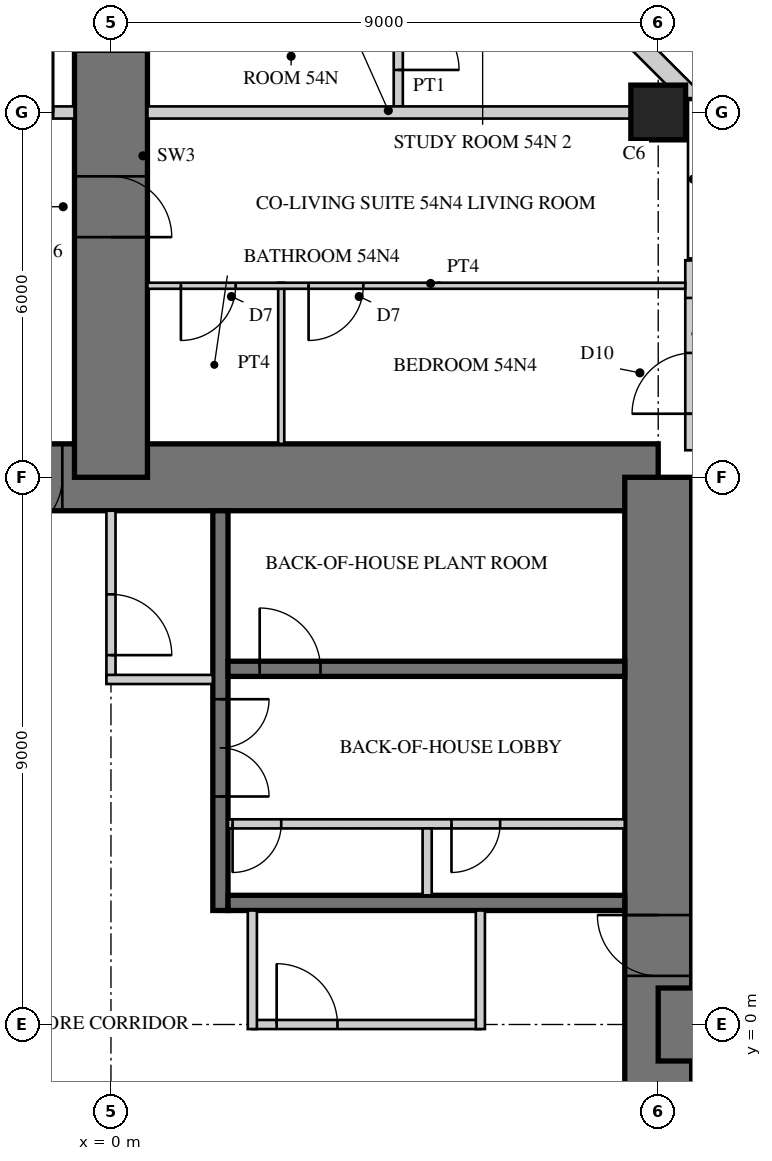
"""IFC4 building model, lengths in metres.
Left out: names, types, materials, properties, quantities, classifications, styles, units other than length and angle.
Written with IfcOpenShell. Run it as: python <this file> out.ifc"""

import sys

from ifc_helpers import new_model, si_unit, direction, frame, frame_2d, origin, origin_2d, place, context, subcontext, project, spatial, rectangle, hollow_rectangle, extrude, element, fill, save


model = new_model("IFC4")
c1 = context("Model", 3, precision=1e-05, world=origin(), true_north=direction((0.0, 1.0)))
c2 = subcontext(c1, "Body", "Model", "MODEL_VIEW")
j1 = project(units=[si_unit("LENGTHUNIT", "METRE"), si_unit("PLANEANGLEUNIT", "RADIAN")], contexts=[c1])
p1 = place(None, origin())
s1 = spatial("IfcSite", under=j1, at=p1, CompositionType="ELEMENT")
p2 = place(p1, origin())
s2 = spatial("IfcBuilding", under=s1, at=p2, CompositionType="ELEMENT")
p3 = place(p2, frame((0.0, 0.0, 213.7)))
s3 = spatial("IfcBuildingStorey", under=s2, at=p3, CompositionType="ELEMENT", Elevation=213.7)
p4 = place(p3, frame((9.0, 9.0, 0.0), z_axis=(0.0, 0.0, 1.0), x_axis=(-1.0, 0.0, 0.0)))
e1 = element("IfcWall", 1, at=p4, inside=s3, PredefinedType="SHEAR", context=c2, shape_type="SweptSolid", body=[
    extrude(rectangle(XDim=18.0, YDim=1.1, at=frame_2d((9.0, 0.0))), origin(), (0.0, 0.0, 1.0), 3.4),
])
p5 = place(p4, frame((9.8, 0.0, 0.0)))
e2 = element("IfcOpeningElement", 2, at=p5, cuts=e1, PredefinedType="OPENING", context=c2, shape_type="SweptSolid", body=[
    extrude(rectangle(XDim=1.0, YDim=2.4, at=frame_2d((0.5, 1.2))), frame((0.0, 0.56, 0.0), z_axis=(0.0, -1.0, 0.0), x_axis=(1.0, 0.0, 0.0)), (0.0, 0.0, 1.0), 1.12),
])
p6 = place(p3, frame((9.0, -9.0, 0.0), z_axis=(0.0, 0.0, 1.0), x_axis=(0.0, 1.0, 0.0)))
e3 = element("IfcWall", 3, at=p6, inside=s3, PredefinedType="SHEAR", context=c2, shape_type="SweptSolid", body=[
    extrude(rectangle(XDim=18.0, YDim=1.1, at=frame_2d((9.0, 0.0))), origin(), (0.0, 0.0, 1.0), 3.4),
])
p7 = place(p6, frame((9.8, 0.0, 0.0)))
e4 = element("IfcOpeningElement", 4, at=p7, cuts=e3, PredefinedType="OPENING", context=c2, shape_type="SweptSolid", body=[
    extrude(rectangle(XDim=1.0, YDim=2.4, at=frame_2d((0.5, 1.2))), frame((0.0, 0.56, 0.0), z_axis=(0.0, -1.0, 0.0), x_axis=(1.0, 0.0, 0.0)), (0.0, 0.0, 1.0), 1.12),
])
p8 = place(p3, frame((1.8, 1.875, 0.0), z_axis=(0.0, 0.0, 1.0), x_axis=(0.0, 1.0, 0.0)))
e5 = element("IfcWall", 5, at=p8, inside=s3, PredefinedType="SHEAR", context=c2, shape_type="SweptSolid", body=[
    extrude(rectangle(XDim=6.575, YDim=0.25, at=frame_2d((3.288, 0.0))), origin(), (0.0, 0.0, 1.0), 3.4),
])
p9 = place(p8, frame((1.875, 0.0, 0.0)))
e6 = element("IfcOpeningElement", 6, at=p9, cuts=e5, PredefinedType="OPENING", context=c2, shape_type="SweptSolid", body=[
    extrude(rectangle(XDim=1.6, YDim=2.4, at=frame_2d((0.8, 1.2))), frame((0.0, 0.135, 0.0), z_axis=(0.0, -1.0, 0.0), x_axis=(1.0, 0.0, 0.0)), (0.0, 0.0, 1.0), 0.27),
])
p10 = place(p3, frame((1.925, 2.0, 0.0), z_axis=(0.0, 0.0, 1.0), x_axis=(1.0, 0.0, 0.0)))
e7 = element("IfcWall", 7, at=p10, inside=s3, PredefinedType="SHEAR", context=c2, shape_type="SweptSolid", body=[
    extrude(rectangle(XDim=6.525, YDim=0.25, at=frame_2d((3.262, 0.0))), origin(), (0.0, 0.0, 1.0), 3.4),
])
p11 = place(p3, frame((1.925, 5.85, 0.0), z_axis=(0.0, 0.0, 1.0), x_axis=(1.0, 0.0, 0.0)))
e8 = element("IfcWall", 8, at=p11, inside=s3, PredefinedType="SHEAR", context=c2, shape_type="SweptSolid", body=[
    extrude(rectangle(XDim=6.525, YDim=0.25, at=frame_2d((3.262, 0.0))), origin(), (0.0, 0.0, 1.0), 3.4),
])
p12 = place(p11, frame((0.521, 0.0, 0.0)))
e9 = element("IfcOpeningElement", 9, at=p12, cuts=e8, PredefinedType="OPENING", context=c2, shape_type="SweptSolid", body=[
    extrude(rectangle(XDim=1.0, YDim=2.1, at=frame_2d((0.5, 1.05))), frame((0.0, 0.135, 0.0), z_axis=(0.0, -1.0, 0.0), x_axis=(1.0, 0.0, 0.0)), (0.0, 0.0, 1.0), 0.27),
])
p13 = place(p3, frame((1.925, 3.3, 0.0), z_axis=(0.0, 0.0, 1.0), x_axis=(1.0, 0.0, 0.0)))
e10 = element("IfcWall", 10, at=p13, inside=s3, PredefinedType="PARTITIONING", context=c2, shape_type="SweptSolid", body=[
    extrude(rectangle(XDim=6.525, YDim=0.15, at=frame_2d((3.262, 0.0))), origin(), (0.0, 0.0, 1.0), 3.4),
])
p14 = place(p13, frame((0.075, 0.0, 0.0)))
e11 = element("IfcOpeningElement", 11, at=p14, cuts=e10, PredefinedType="OPENING", context=c2, shape_type="SweptSolid", body=[
    extrude(rectangle(XDim=0.8, YDim=2.1, at=frame_2d((0.4, 1.05))), frame((0.0, 0.085, 0.0), z_axis=(0.0, -1.0, 0.0), x_axis=(1.0, 0.0, 0.0)), (0.0, 0.0, 1.0), 0.17),
])
p15 = place(p13, frame((3.675, 0.0, 0.0)))
e12 = element("IfcOpeningElement", 12, at=p15, cuts=e10, PredefinedType="OPENING", context=c2, shape_type="SweptSolid", body=[
    extrude(rectangle(XDim=0.8, YDim=2.1, at=frame_2d((0.4, 1.05))), frame((0.0, 0.085, 0.0), z_axis=(0.0, -1.0, 0.0), x_axis=(1.0, 0.0, 0.0)), (0.0, 0.0, 1.0), 0.17),
])
p16 = place(p3, frame((5.2, 2.125, 0.0), z_axis=(0.0, 0.0, 1.0), x_axis=(0.0, 1.0, 0.0)))
e13 = element("IfcWall", 13, at=p16, inside=s3, PredefinedType="PARTITIONING", context=c2, shape_type="SweptSolid", body=[
    extrude(rectangle(XDim=1.1, YDim=0.15, at=frame_2d((0.55, 0.0))), origin(), (0.0, 0.0, 1.0), 3.4),
])
p17 = place(p3, frame((0.0, 9.0, 0.0), z_axis=(0.0, 0.0, 1.0), x_axis=(0.0, 1.0, 0.0)))
e14 = element("IfcWall", 14, at=p17, inside=s3, PredefinedType="SHEAR", context=c2, shape_type="SweptSolid", body=[
    extrude(rectangle(XDim=9.0, YDim=1.2, at=frame_2d((4.5, 0.0))), origin(), (0.0, 0.0, 1.0), 3.4),
])
p18 = place(p17, frame((3.95, 0.0, 0.0)))
e15 = element("IfcOpeningElement", 15, at=p18, cuts=e14, PredefinedType="OPENING", context=c2, shape_type="SweptSolid", body=[
    extrude(rectangle(XDim=1.0, YDim=2.15, at=frame_2d((0.5, 1.075))), frame((0.0, 0.61, 0.0), z_axis=(0.0, -1.0, 0.0), x_axis=(1.0, 0.0, 0.0)), (0.0, 0.0, 1.0), 1.22),
])
p19 = place(p17, frame((7.0, 0.0, 0.0)))
e16 = element("IfcOpeningElement", 16, at=p19, cuts=e14, PredefinedType="OPENING", context=c2, shape_type="SweptSolid", body=[
    extrude(rectangle(XDim=1.0, YDim=2.2, at=frame_2d((0.5, 1.1))), frame((0.0, 0.61, 0.0), z_axis=(0.0, -1.0, 0.0), x_axis=(1.0, 0.0, 0.0)), (0.0, 0.0, 1.0), 1.22),
])
p20 = place(p3, frame((9.0, 0.0, 0.0), z_axis=(0.0, 0.0, 1.0), x_axis=(1.0, 0.0, 0.0)))
e17 = element("IfcWall", 17, at=p20, inside=s3, PredefinedType="SHEAR", context=c2, shape_type="SweptSolid", body=[
    extrude(rectangle(XDim=9.0, YDim=1.2, at=frame_2d((4.5, 0.0))), origin(), (0.0, 0.0, 1.0), 3.4),
])
p21 = place(p20, frame((3.95, 0.0, 0.0)))
e18 = element("IfcOpeningElement", 18, at=p21, cuts=e17, PredefinedType="OPENING", context=c2, shape_type="SweptSolid", body=[
    extrude(rectangle(XDim=1.0, YDim=2.15, at=frame_2d((0.5, 1.075))), frame((0.0, 0.61, 0.0), z_axis=(0.0, -1.0, 0.0), x_axis=(1.0, 0.0, 0.0)), (0.0, 0.0, 1.0), 1.22),
])
p22 = place(p20, frame((7.0, 0.0, 0.0)))
e19 = element("IfcOpeningElement", 19, at=p22, cuts=e17, PredefinedType="OPENING", context=c2, shape_type="SweptSolid", body=[
    extrude(rectangle(XDim=1.0, YDim=2.2, at=frame_2d((0.5, 1.1))), frame((0.0, 0.61, 0.0), z_axis=(0.0, -1.0, 0.0), x_axis=(1.0, 0.0, 0.0)), (0.0, 0.0, 1.0), 1.22),
])
p23 = place(p3, frame((9.0, 15.0, 0.0), z_axis=(0.0, 0.0, 1.0), x_axis=(1.0, 0.0, 0.0)))
e20 = element("IfcColumn", 20, at=p23, inside=s3, PredefinedType="COLUMN", context=c2, shape_type="SweptSolid", body=[
    extrude(rectangle(XDim=0.9, YDim=0.9, at=origin_2d()), origin(), (0.0, 0.0, 1.0), 3.4),
])
p24 = place(p3, frame((9.57, 9.445, 0.0), z_axis=(0.0, 0.0, 1.0), x_axis=(0.0, 1.0, 0.0)))
e21 = element("IfcWall", 21, at=p24, inside=s3, PredefinedType="SOLIDWALL", context=c2, shape_type="SweptSolid", body=[
    extrude(rectangle(XDim=3.125, YDim=0.25, at=frame_2d((1.562, 0.0))), origin(), (0.0, 0.0, 1.0), 3.15),
])
p25 = place(p24, frame((0.6, 0.0, 0.0)))
e22 = element("IfcOpeningElement", 22, at=p25, cuts=e21, PredefinedType="OPENING", context=c2, shape_type="SweptSolid", body=[
    extrude(rectangle(XDim=1.0, YDim=2.2, at=frame_2d((0.5, 1.1))), frame((0.0, 0.135, 0.0), z_axis=(0.0, -1.0, 0.0), x_axis=(1.0, 0.0, 0.0)), (0.0, 0.0, 1.0), 0.27),
])
p26 = place(p3, frame((9.57, 15.236, 0.0), z_axis=(0.0, 0.0, 1.0), x_axis=(-0.707106781187, 0.707106781187, 0.0)))
e23 = element("IfcWall", 23, at=p26, inside=s3, PredefinedType="SOLIDWALL", context=c2, shape_type="SweptSolid", body=[
    extrude(rectangle(XDim=4.757, YDim=0.3, at=frame_2d((2.379, 0.0))), origin(), (0.0, 0.0, 1.0), 3.15),
])
p27 = place(p26, frame((1.929, 0.0, 0.3)))
e24 = element("IfcOpeningElement", 24, at=p27, cuts=e23, PredefinedType="OPENING", context=c2, shape_type="SweptSolid", body=[
    extrude(rectangle(XDim=0.9, YDim=2.4, at=frame_2d((0.45, 1.2))), frame((0.0, 0.16, 0.0), z_axis=(0.0, -1.0, 0.0), x_axis=(1.0, 0.0, 0.0)), (0.0, 0.0, 1.0), 0.32),
])
p28 = place(p3, frame((2.325, 0.0, 0.0), z_axis=(0.0, 0.0, 1.0), x_axis=(1.0, 0.0, 0.0)))
e25 = element("IfcWall", 25, at=p28, inside=s3, PredefinedType="PARTITIONING", context=c2, shape_type="SweptSolid", body=[
    extrude(rectangle(XDim=3.75, YDim=0.15, at=frame_2d((1.875, 0.0))), origin(), (0.0, 0.0, 1.0), 3.15),
])
p29 = place(p28, frame((0.4, 0.0, 0.0)))
e26 = element("IfcOpeningElement", 26, at=p29, cuts=e25, PredefinedType="OPENING", context=c2, shape_type="SweptSolid", body=[
    extrude(rectangle(XDim=1.0, YDim=2.1, at=frame_2d((0.5, 1.05))), frame((0.0, 0.085, 0.0), z_axis=(0.0, -1.0, 0.0), x_axis=(1.0, 0.0, 0.0)), (0.0, 0.0, 1.0), 0.17),
])
for number, where, z_axis, x_axis in (
    (27, (2.325, 1.875, 0.0), (0.0, 0.0, 1.0), (0.0, -1.0, 0.0)),
    (28, (6.075, -0.075, 0.0), (0.0, 0.0, 1.0), (0.0, 1.0, 0.0)),
):
    element("IfcWall", number, at=place(p3, frame(where, z_axis=z_axis, x_axis=x_axis)), inside=s3, PredefinedType="PARTITIONING", context=c2, shape_type="SweptSolid", body=[
        extrude(rectangle(XDim=1.95, YDim=0.15, at=frame_2d((0.975, 0.0))), origin(), (0.0, 0.0, 1.0), 3.15),
    ])
p30 = place(p3, frame((0.0, 5.675, 0.0), z_axis=(0.0, 0.0, 1.0), x_axis=(0.0, 1.0, 0.0)))
e29 = element("IfcWall", 29, at=p30, inside=s3, PredefinedType="PARTITIONING", context=c2, shape_type="SweptSolid", body=[
    extrude(rectangle(XDim=2.775, YDim=0.15, at=frame_2d((1.387, 0.0))), origin(), (0.0, 0.0, 1.0), 3.15),
])
p31 = place(p30, frame((0.4, 0.0, 0.0)))
e30 = element("IfcOpeningElement", 30, at=p31, cuts=e29, PredefinedType="OPENING", context=c2, shape_type="SweptSolid", body=[
    extrude(rectangle(XDim=1.0, YDim=2.1, at=frame_2d((0.5, 1.05))), frame((0.0, 0.085, 0.0), z_axis=(0.0, -1.0, 0.0), x_axis=(1.0, 0.0, 0.0)), (0.0, 0.0, 1.0), 0.17),
])
p32 = place(p3, frame((1.675, 5.675, 0.0), z_axis=(0.0, 0.0, 1.0), x_axis=(-1.0, 0.0, 0.0)))
e31 = element("IfcWall", 31, at=p32, inside=s3, PredefinedType="PARTITIONING", context=c2, shape_type="SweptSolid", body=[
    extrude(rectangle(XDim=1.75, YDim=0.15, at=frame_2d((0.875, 0.0))), origin(), (0.0, 0.0, 1.0), 3.15),
])
p33 = place(p3, frame((2.8, 9.55, 0.0), z_axis=(0.0, 0.0, 1.0), x_axis=(0.0, 1.0, 0.0)))
e32 = element("IfcWall", 32, at=p33, inside=s3, PredefinedType="PARTITIONING", context=c2, shape_type="SweptSolid", body=[
    extrude(rectangle(XDim=2.65, YDim=0.1, at=frame_2d((1.325, 0.0))), origin(), (0.0, 0.0, 1.0), 3.15),
])
p34 = place(p3, frame((9.445, 12.15, 0.0), z_axis=(0.0, 0.0, 1.0), x_axis=(-1.0, 0.0, 0.0)))
e33 = element("IfcWall", 33, at=p34, inside=s3, PredefinedType="PARTITIONING", context=c2, shape_type="SweptSolid", body=[
    extrude(rectangle(XDim=8.845, YDim=0.1, at=frame_2d((4.422, 0.0))), origin(), (0.0, 0.0, 1.0), 3.15),
])
p35 = place(p34, frame((5.295, 0.0, 0.0)))
e34 = element("IfcOpeningElement", 34, at=p35, cuts=e33, PredefinedType="OPENING", context=c2, shape_type="SweptSolid", body=[
    extrude(rectangle(XDim=0.9, YDim=2.1, at=frame_2d((0.45, 1.05))), frame((0.0, 0.06, 0.0), z_axis=(0.0, -1.0, 0.0), x_axis=(1.0, 0.0, 0.0)), (0.0, 0.0, 1.0), 0.12),
])
p36 = place(p34, frame((7.395, 0.0, 0.0)))
e35 = element("IfcOpeningElement", 35, at=p36, cuts=e33, PredefinedType="OPENING", context=c2, shape_type="SweptSolid", body=[
    extrude(rectangle(XDim=0.9, YDim=2.1, at=frame_2d((0.45, 1.05))), frame((0.0, 0.06, 0.0), z_axis=(0.0, -1.0, 0.0), x_axis=(1.0, 0.0, 0.0)), (0.0, 0.0, 1.0), 0.12),
])
p37 = place(p3, frame((4.725, 15.1, 0.0), z_axis=(0.0, 0.0, 1.0), x_axis=(0.0, 1.0, 0.0)))
e36 = element("IfcWall", 36, at=p37, inside=s3, PredefinedType="PARTITIONING", context=c2, shape_type="SweptSolid", body=[
    extrude(rectangle(XDim=2.45, YDim=0.15, at=frame_2d((1.225, 0.0))), origin(), (0.0, 0.0, 1.0), 3.15),
])
p38 = place(p37, frame((0.6, 0.0, 0.0)))
e37 = element("IfcOpeningElement", 37, at=p38, cuts=e36, PredefinedType="OPENING", context=c2, shape_type="SweptSolid", body=[
    extrude(rectangle(XDim=1.0, YDim=2.1, at=frame_2d((0.5, 1.05))), frame((0.0, 0.085, 0.0), z_axis=(0.0, -1.0, 0.0), x_axis=(1.0, 0.0, 0.0)), (0.0, 0.0, 1.0), 0.17),
])
p39 = place(p3, frame((8.55, 15.0, 0.0), z_axis=(0.0, 0.0, 1.0), x_axis=(-1.0, 0.0, 0.0)))
e38 = element("IfcWall", 38, at=p39, inside=s3, PredefinedType="SOLIDWALL", context=c2, shape_type="SweptSolid", body=[
    extrude(rectangle(XDim=7.95, YDim=0.2, at=frame_2d((3.975, 0.0))), origin(), (0.0, 0.0, 1.0), 2.1),
])
p40 = place(p3, frame((-0.6, 15.0, 0.0), z_axis=(0.0, 0.0, 1.0), x_axis=(-1.0, 0.0, 0.0)))
e39 = element("IfcWall", 39, at=p40, inside=s3, PredefinedType="SOLIDWALL", context=c2, shape_type="SweptSolid", body=[
    extrude(rectangle(XDim=7.95, YDim=0.2, at=frame_2d((3.975, 0.0))), origin(), (0.0, 0.0, 1.0), 2.1),
])
p41 = place(p40, frame((0.35, 0.0, 0.0)))
e40 = element("IfcOpeningElement", 40, at=p41, cuts=e39, PredefinedType="OPENING", context=c2, shape_type="SweptSolid", body=[
    extrude(rectangle(XDim=1.0, YDim=2.0, at=frame_2d((0.5, 1.0))), frame((0.0, 0.11, 0.0), z_axis=(0.0, -1.0, 0.0), x_axis=(1.0, 0.0, 0.0)), (0.0, 0.0, 1.0), 0.22),
])
p42 = place(p25, origin())
e41 = element("IfcDoor", 41, at=p42, inside=s3, OperationType="SINGLE_SWING_LEFT", PredefinedType="DOOR", context=c2, shape_type="SweptSolid", body=[
    extrude(hollow_rectangle(XDim=1.0, YDim=2.2, WallThickness=0.06, at=frame_2d((0.5, 1.1))), frame((0.0, 0.025, 0.0), z_axis=(0.0, -1.0, 0.0), x_axis=(1.0, 0.0, 0.0)), (0.0, 0.0, 1.0), 0.05),
    extrude(rectangle(XDim=0.879, YDim=2.079, at=frame_2d((0.5, 1.1))), frame((0.0, 0.025, 0.0), z_axis=(0.0, -1.0, 0.0), x_axis=(1.0, 0.0, 0.0)), (0.0, 0.0, 1.0), 0.05),
])
fill(e22, e41)
p43 = place(p29, origin())
e42 = element("IfcDoor", 42, at=p43, inside=s3, OperationType="SINGLE_SWING_LEFT", PredefinedType="DOOR", context=c2, shape_type="SweptSolid", body=[
    extrude(rectangle(XDim=1.0, YDim=2.1, at=frame_2d((0.5, 1.05))), frame((0.0, 0.025, 0.0), z_axis=(0.0, -1.0, 0.0), x_axis=(1.0, 0.0, 0.0)), (0.0, 0.0, 1.0), 0.05),
])
fill(e26, e42)
p44 = place(p31, frame((1.0, 0.0, 0.0), z_axis=(0.0, 0.0, 1.0), x_axis=(-1.0, 0.0, 0.0)))
e43 = element("IfcDoor", 43, at=p44, inside=s3, OperationType="SINGLE_SWING_RIGHT", PredefinedType="DOOR", context=c2, shape_type="SweptSolid", body=[
    extrude(rectangle(XDim=1.0, YDim=2.1, at=frame_2d((0.5, 1.05))), frame((0.0, 0.025, 0.0), z_axis=(0.0, -1.0, 0.0), x_axis=(1.0, 0.0, 0.0)), (0.0, 0.0, 1.0), 0.05),
])
fill(e30, e43)
p45 = place(p35, origin())
e44 = element("IfcDoor", 44, at=p45, inside=s3, OperationType="SINGLE_SWING_RIGHT", PredefinedType="DOOR", context=c2, shape_type="SweptSolid", body=[
    extrude(rectangle(XDim=0.9, YDim=2.1, at=frame_2d((0.45, 1.05))), frame((0.0, 0.025, 0.0), z_axis=(0.0, -1.0, 0.0), x_axis=(1.0, 0.0, 0.0)), (0.0, 0.0, 1.0), 0.05),
])
fill(e34, e44)
p46 = place(p36, origin())
e45 = element("IfcDoor", 45, at=p46, inside=s3, OperationType="SINGLE_SWING_RIGHT", PredefinedType="DOOR", context=c2, shape_type="SweptSolid", body=[
    extrude(rectangle(XDim=0.9, YDim=2.1, at=frame_2d((0.45, 1.05))), frame((0.0, 0.025, 0.0), z_axis=(0.0, -1.0, 0.0), x_axis=(1.0, 0.0, 0.0)), (0.0, 0.0, 1.0), 0.05),
])
fill(e35, e45)
p47 = place(p38, frame((1.0, 0.0, 0.0), z_axis=(0.0, 0.0, 1.0), x_axis=(-1.0, 0.0, 0.0)))
e46 = element("IfcDoor", 46, at=p47, inside=s3, OperationType="SINGLE_SWING_RIGHT", PredefinedType="DOOR", context=c2, shape_type="SweptSolid", body=[
    extrude(rectangle(XDim=1.0, YDim=2.1, at=frame_2d((0.5, 1.05))), frame((0.0, 0.025, 0.0), z_axis=(0.0, -1.0, 0.0), x_axis=(1.0, 0.0, 0.0)), (0.0, 0.0, 1.0), 0.05),
])
fill(e37, e46)
p48 = place(p41, frame((1.0, 0.0, 0.0), z_axis=(0.0, 0.0, 1.0), x_axis=(-1.0, 0.0, 0.0)))
e47 = element("IfcDoor", 47, at=p48, inside=s3, OperationType="SINGLE_SWING_RIGHT", PredefinedType="DOOR", context=c2, shape_type="SweptSolid", body=[
    extrude(rectangle(XDim=1.0, YDim=2.0, at=frame_2d((0.5, 1.0))), frame((0.0, 0.025, 0.0), z_axis=(0.0, -1.0, 0.0), x_axis=(1.0, 0.0, 0.0)), (0.0, 0.0, 1.0), 0.05),
])
fill(e40, e47)
p49 = place(p18, frame((1.0, 0.0, 0.0), z_axis=(0.0, 0.0, 1.0), x_axis=(-1.0, 0.0, 0.0)))
e48 = element("IfcDoor", 48, at=p49, inside=s3, OperationType="SINGLE_SWING_RIGHT", PredefinedType="DOOR", context=c2, shape_type="SweptSolid", body=[
    extrude(rectangle(XDim=1.0, YDim=2.15, at=frame_2d((0.5, 1.075))), frame((0.0, 0.025, 0.0), z_axis=(0.0, -1.0, 0.0), x_axis=(1.0, 0.0, 0.0)), (0.0, 0.0, 1.0), 0.05),
])
fill(e15, e48)
p50 = place(p5, origin())
e49 = element("IfcDoor", 49, at=p50, inside=s3, OperationType="SINGLE_SWING_RIGHT", PredefinedType="DOOR", context=c2, shape_type="SweptSolid", body=[
    extrude(rectangle(XDim=1.0, YDim=2.4, at=frame_2d((0.5, 1.2))), frame((0.0, 0.055, 0.0), z_axis=(0.0, -1.0, 0.0), x_axis=(1.0, 0.0, 0.0)), (0.0, 0.0, 1.0), 0.05),
])
fill(e2, e49)
p51 = place(p7, origin())
e50 = element("IfcDoor", 50, at=p51, inside=s3, OperationType="SINGLE_SWING_RIGHT", PredefinedType="DOOR", context=c2, shape_type="SweptSolid", body=[
    extrude(rectangle(XDim=1.0, YDim=2.4, at=frame_2d((0.5, 1.2))), frame((0.0, 0.055, 0.0), z_axis=(0.0, -1.0, 0.0), x_axis=(1.0, 0.0, 0.0)), (0.0, 0.0, 1.0), 0.05),
])
fill(e4, e50)
p52 = place(p9, frame((1.6, 0.0, 0.0), z_axis=(0.0, 0.0, 1.0), x_axis=(-1.0, 0.0, 0.0)))
e51 = element("IfcDoor", 51, at=p52, inside=s3, OperationType="DOUBLE_DOOR_SINGLE_SWING", PredefinedType="DOOR", context=c2, shape_type="SweptSolid", body=[
    extrude(rectangle(XDim=1.6, YDim=2.4, at=frame_2d((0.8, 1.2))), frame((0.0, 0.025, 0.0), z_axis=(0.0, -1.0, 0.0), x_axis=(1.0, 0.0, 0.0)), (0.0, 0.0, 1.0), 0.05),
])
fill(e6, e51)
p53 = place(p14, frame((0.8, 0.0, 0.0), z_axis=(0.0, 0.0, 1.0), x_axis=(-1.0, 0.0, 0.0)))
e52 = element("IfcDoor", 52, at=p53, inside=s3, OperationType="SINGLE_SWING_RIGHT", PredefinedType="DOOR", context=c2, shape_type="SweptSolid", body=[
    extrude(rectangle(XDim=0.8, YDim=2.1, at=frame_2d((0.4, 1.05))), frame((0.0, 0.025, 0.0), z_axis=(0.0, -1.0, 0.0), x_axis=(1.0, 0.0, 0.0)), (0.0, 0.0, 1.0), 0.05),
])
fill(e11, e52)
p54 = place(p15, frame((0.8, 0.0, 0.0), z_axis=(0.0, 0.0, 1.0), x_axis=(-1.0, 0.0, 0.0)))
e53 = element("IfcDoor", 53, at=p54, inside=s3, OperationType="SINGLE_SWING_RIGHT", PredefinedType="DOOR", context=c2, shape_type="SweptSolid", body=[
    extrude(rectangle(XDim=0.8, YDim=2.1, at=frame_2d((0.4, 1.05))), frame((0.0, 0.025, 0.0), z_axis=(0.0, -1.0, 0.0), x_axis=(1.0, 0.0, 0.0)), (0.0, 0.0, 1.0), 0.05),
])
fill(e12, e53)
p55 = place(p12, origin())
e54 = element("IfcDoor", 54, at=p55, inside=s3, OperationType="SINGLE_SWING_LEFT", PredefinedType="DOOR", context=c2, shape_type="SweptSolid", body=[
    extrude(rectangle(XDim=1.0, YDim=2.1, at=frame_2d((0.5, 1.05))), frame((0.0, 0.025, 0.0), z_axis=(0.0, -1.0, 0.0), x_axis=(1.0, 0.0, 0.0)), (0.0, 0.0, 1.0), 0.05),
])
fill(e9, e54)
save(model, sys.argv[1])
